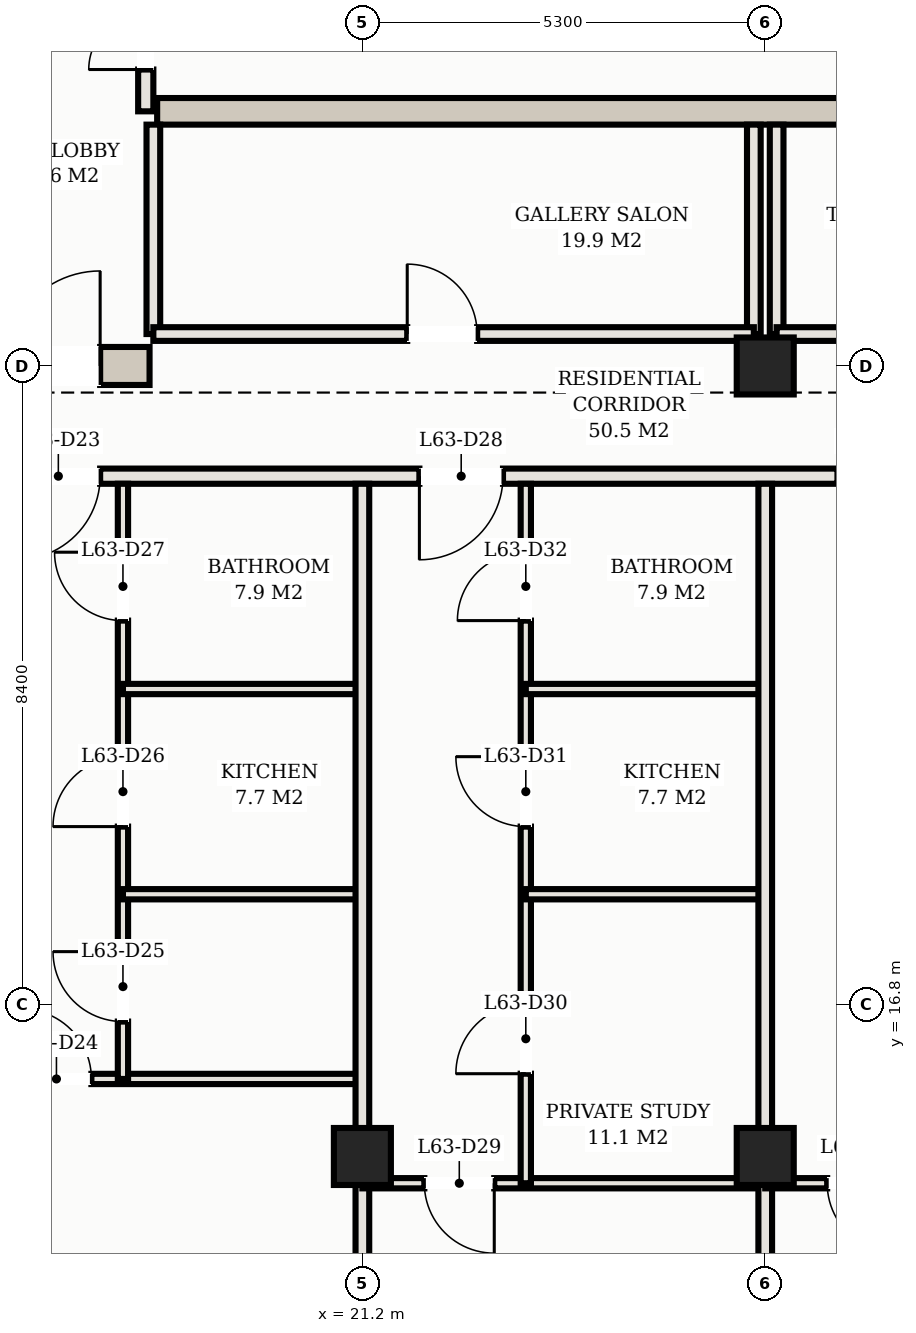
"""IFC4 building model, lengths in metres.
Left out: names, types, materials, properties, quantities, classifications, styles, units other than length and angle.
Written with IfcOpenShell. Run it as: python <this file> out.ifc"""

import sys

from ifc_helpers import new_model, si_unit, direction, frame, frame_2d, origin, origin_2d, place, context, subcontext, project, spatial, rectangle, hollow_rectangle, extrude, element, fill, save


model = new_model("IFC4")
c1 = context("Model", 3, precision=1e-05, world=origin(), true_north=direction((0.0, 1.0)))
c2 = subcontext(c1, "Body", "Model", "MODEL_VIEW")
j1 = project(units=[si_unit("LENGTHUNIT", "METRE"), si_unit("PLANEANGLEUNIT", "RADIAN")], contexts=[c1])
p1 = place(None, origin())
s1 = spatial("IfcSite", under=j1, at=p1, CompositionType="ELEMENT")
p2 = place(p1, origin())
s2 = spatial("IfcBuilding", under=s1, at=p2, CompositionType="ELEMENT")
p3 = place(p2, frame((0.0, 0.0, 229.7)))
s3 = spatial("IfcBuildingStorey", under=s2, at=p3, CompositionType="ELEMENT", Elevation=229.7)
p4 = place(p3, frame((10.35, 25.2, 0.0), z_axis=(0.0, 0.0, 1.0), x_axis=(1.0, 0.0, 0.0)))
e1 = element("IfcWall", 1, at=p4, inside=s3, PredefinedType="SHEAR", context=c2, shape_type="SweptSolid", body=[
    extrude(rectangle(XDim=8.05, YDim=0.5, at=frame_2d((4.025, 0.0))), origin(), (0.0, 0.0, 1.0), 3.11),
])
p5 = place(p4, frame((6.15, 0.0, 0.0)))
e2 = element("IfcOpeningElement", 2, at=p5, cuts=e1, PredefinedType="OPENING", context=c2, shape_type="SweptSolid", body=[
    extrude(rectangle(XDim=1.25, YDim=2.2, at=frame_2d((0.625, 1.1))), frame((0.0, 0.26, 0.0), z_axis=(0.0, -1.0, 0.0), x_axis=(1.0, 0.0, 0.0)), (0.0, 0.0, 1.0), 0.52),
])
p6 = place(p3, frame((18.5, 28.55, 0.0), z_axis=(0.0, 0.0, 1.0), x_axis=(1.0, 0.0, 0.0)))
e3 = element("IfcWall", 3, at=p6, inside=s3, PredefinedType="SHEAR", context=c2, shape_type="SweptSolid", body=[
    extrude(rectangle(XDim=16.0, YDim=0.35, at=frame_2d((8.0, 0.0))), origin(), (0.0, 0.0, 1.0), 3.11),
])
for number, where, z_axis, x_axis in (
    (4, (26.5, 25.2, 0.0), (0.0, 0.0, 1.0), (1.0, 0.0, 0.0)),
    (5, (21.2, 14.8, 0.0), (0.0, 0.0, 1.0), (1.0, 0.0, 0.0)),
    (6, (26.5, 14.8, 0.0), (0.0, 0.0, 1.0), (1.0, 0.0, 0.0)),
):
    element("IfcColumn", number, at=place(p3, frame(where, z_axis=z_axis, x_axis=x_axis)), inside=s3, PredefinedType="COLUMN", context=c2, shape_type="SweptSolid", body=[
        extrude(hollow_rectangle(XDim=0.75, YDim=0.75, WallThickness=0.025, at=origin_2d()), origin(), (0.0, 0.0, 1.0), 3.3),
    ])
p7 = place(p3, frame((18.35, 28.55, 0.0), z_axis=(0.0, 0.0, 1.0), x_axis=(0.0, 1.0, 0.0)))
e7 = element("IfcWall", 7, at=p7, inside=s3, PredefinedType="PARTITIONING", context=c2, shape_type="SweptSolid", body=[
    extrude(rectangle(XDim=2.6, YDim=0.2, at=frame_2d((1.3, 0.0))), origin(), (0.0, 0.0, 1.0), 2.43),
])
p8 = place(p7, frame((0.55, 0.0, 0.0)))
e8 = element("IfcOpeningElement", 8, at=p8, cuts=e7, PredefinedType="OPENING", context=c2, shape_type="SweptSolid", body=[
    extrude(rectangle(XDim=1.5, YDim=2.25, at=frame_2d((0.75, 1.125))), frame((0.0, 0.11, 0.0), z_axis=(0.0, -1.0, 0.0), x_axis=(1.0, 0.0, 0.0)), (0.0, 0.0, 1.0), 0.22),
])
for number, where, z_axis, x_axis in (
    (9, (18.45, 25.62, 0.0), (0.0, 0.0, 1.0), (0.0, 1.0, 0.0)),
    (10, (26.35, 25.62, 0.0), (0.0, 0.0, 1.0), (0.0, 1.0, 0.0)),
):
    element("IfcWall", number, at=place(p3, frame(where, z_axis=z_axis, x_axis=x_axis)), inside=s3, PredefinedType="PARTITIONING", context=c2, shape_type="SweptSolid", body=[
        extrude(rectangle(XDim=2.755, YDim=0.18, at=frame_2d((1.377, 0.0))), origin(), (0.0, 0.0, 1.0), 2.43),
    ])
p9 = place(p3, frame((18.45, 25.62, 0.0), z_axis=(0.0, 0.0, 1.0), x_axis=(1.0, 0.0, 0.0)))
e11 = element("IfcWall", 11, at=p9, inside=s3, PredefinedType="PARTITIONING", context=c2, shape_type="SweptSolid", body=[
    extrude(rectangle(XDim=7.9, YDim=0.18, at=frame_2d((3.95, 0.0))), origin(), (0.0, 0.0, 1.0), 2.43),
])
p10 = place(p9, frame((3.34, 0.0, 0.0)))
e12 = element("IfcOpeningElement", 12, at=p10, cuts=e11, PredefinedType="OPENING", context=c2, shape_type="SweptSolid", body=[
    extrude(rectangle(XDim=0.92, YDim=2.15, at=frame_2d((0.46, 1.075))), frame((0.0, 0.1, 0.0), z_axis=(0.0, -1.0, 0.0), x_axis=(1.0, 0.0, 0.0)), (0.0, 0.0, 1.0), 0.2),
])
p11 = place(p3, frame((26.65, 25.62, 0.0), z_axis=(0.0, 0.0, 1.0), x_axis=(0.0, 1.0, 0.0)))
e13 = element("IfcWall", 13, at=p11, inside=s3, PredefinedType="PARTITIONING", context=c2, shape_type="SweptSolid", body=[
    extrude(rectangle(XDim=2.755, YDim=0.18, at=frame_2d((1.377, 0.0))), origin(), (0.0, 0.0, 1.0), 2.43),
])
p12 = place(p3, frame((26.65, 25.62, 0.0), z_axis=(0.0, 0.0, 1.0), x_axis=(1.0, 0.0, 0.0)))
e14 = element("IfcWall", 14, at=p12, inside=s3, PredefinedType="PARTITIONING", context=c2, shape_type="SweptSolid", body=[
    extrude(rectangle(XDim=7.9, YDim=0.18, at=frame_2d((3.95, 0.0))), origin(), (0.0, 0.0, 1.0), 2.43),
])
p13 = place(p12, frame((3.34, 0.0, 0.0)))
e15 = element("IfcOpeningElement", 15, at=p13, cuts=e14, PredefinedType="OPENING", context=c2, shape_type="SweptSolid", body=[
    extrude(rectangle(XDim=0.92, YDim=2.15, at=frame_2d((0.46, 1.075))), frame((0.0, 0.1, 0.0), z_axis=(0.0, -1.0, 0.0), x_axis=(1.0, 0.0, 0.0)), (0.0, 0.0, 1.0), 0.2),
])
p14 = place(p3, frame((6.72, 23.75, 0.0), z_axis=(0.0, 0.0, 1.0), x_axis=(1.0, 0.0, 0.0)))
e16 = element("IfcWall", 16, at=p14, inside=s3, PredefinedType="PARTITIONING", context=c2, shape_type="SweptSolid", body=[
    extrude(rectangle(XDim=39.56, YDim=0.2, at=frame_2d((19.78, 0.0))), origin(), (0.0, 0.0, 1.0), 2.43),
])
p15 = place(p14, frame((4.63, 0.0, 0.0)))
e17 = element("IfcOpeningElement", 17, at=p15, cuts=e16, PredefinedType="OPENING", context=c2, shape_type="SweptSolid", body=[
    extrude(rectangle(XDim=1.1, YDim=2.25, at=frame_2d((0.55, 1.125))), frame((0.0, 0.11, 0.0), z_axis=(0.0, -1.0, 0.0), x_axis=(1.0, 0.0, 0.0)), (0.0, 0.0, 1.0), 0.22),
])
p16 = place(p14, frame((9.93, 0.0, 0.0)))
e18 = element("IfcOpeningElement", 18, at=p16, cuts=e16, PredefinedType="OPENING", context=c2, shape_type="SweptSolid", body=[
    extrude(rectangle(XDim=1.1, YDim=2.25, at=frame_2d((0.55, 1.125))), frame((0.0, 0.11, 0.0), z_axis=(0.0, -1.0, 0.0), x_axis=(1.0, 0.0, 0.0)), (0.0, 0.0, 1.0), 0.22),
])
p17 = place(p14, frame((15.23, 0.0, 0.0)))
e19 = element("IfcOpeningElement", 19, at=p17, cuts=e16, PredefinedType="OPENING", context=c2, shape_type="SweptSolid", body=[
    extrude(rectangle(XDim=1.1, YDim=2.25, at=frame_2d((0.55, 1.125))), frame((0.0, 0.11, 0.0), z_axis=(0.0, -1.0, 0.0), x_axis=(1.0, 0.0, 0.0)), (0.0, 0.0, 1.0), 0.22),
])
p18 = place(p14, frame((20.73, 0.0, 0.0)))
e20 = element("IfcOpeningElement", 20, at=p18, cuts=e16, PredefinedType="OPENING", context=c2, shape_type="SweptSolid", body=[
    extrude(rectangle(XDim=1.1, YDim=2.25, at=frame_2d((0.55, 1.125))), frame((0.0, 0.11, 0.0), z_axis=(0.0, -1.0, 0.0), x_axis=(1.0, 0.0, 0.0)), (0.0, 0.0, 1.0), 0.22),
])
p19 = place(p14, frame((25.83, 0.0, 0.0)))
e21 = element("IfcOpeningElement", 21, at=p19, cuts=e16, PredefinedType="OPENING", context=c2, shape_type="SweptSolid", body=[
    extrude(rectangle(XDim=1.1, YDim=2.25, at=frame_2d((0.55, 1.125))), frame((0.0, 0.11, 0.0), z_axis=(0.0, -1.0, 0.0), x_axis=(1.0, 0.0, 0.0)), (0.0, 0.0, 1.0), 0.22),
])
p20 = place(p14, frame((31.13, 0.0, 0.0)))
e22 = element("IfcOpeningElement", 22, at=p20, cuts=e16, PredefinedType="OPENING", context=c2, shape_type="SweptSolid", body=[
    extrude(rectangle(XDim=1.1, YDim=2.25, at=frame_2d((0.55, 1.125))), frame((0.0, 0.11, 0.0), z_axis=(0.0, -1.0, 0.0), x_axis=(1.0, 0.0, 0.0)), (0.0, 0.0, 1.0), 0.22),
])
p21 = place(p14, frame((2.085, 0.0, 0.0)))
e23 = element("IfcOpeningElement", 23, at=p21, cuts=e16, PredefinedType="OPENING", context=c2, shape_type="SweptSolid", body=[
    extrude(rectangle(XDim=0.92, YDim=2.15, at=frame_2d((0.46, 1.075))), frame((0.0, 0.11, 0.0), z_axis=(0.0, -1.0, 0.0), x_axis=(1.0, 0.0, 0.0)), (0.0, 0.0, 1.0), 0.22),
])
p22 = place(p14, frame((36.555, 0.0, 0.0)))
e24 = element("IfcOpeningElement", 24, at=p22, cuts=e16, PredefinedType="OPENING", context=c2, shape_type="SweptSolid", body=[
    extrude(rectangle(XDim=0.92, YDim=2.15, at=frame_2d((0.46, 1.075))), frame((0.0, 0.11, 0.0), z_axis=(0.0, -1.0, 0.0), x_axis=(1.0, 0.0, 0.0)), (0.0, 0.0, 1.0), 0.22),
])
p23 = place(p3, frame((15.9, 15.82, 0.0), z_axis=(0.0, 0.0, 1.0), x_axis=(1.0, 0.0, 0.0)))
e25 = element("IfcWall", 25, at=p23, inside=s3, PredefinedType="PARTITIONING", context=c2, shape_type="SweptSolid", body=[
    extrude(rectangle(XDim=5.3, YDim=0.135, at=frame_2d((2.65, 0.0))), origin(), (0.0, 0.0, 1.0), 2.43),
])
p24 = place(p23, frame((0.815, 0.0, 0.0)))
e26 = element("IfcOpeningElement", 26, at=p24, cuts=e25, PredefinedType="OPENING", context=c2, shape_type="SweptSolid", body=[
    extrude(rectangle(XDim=0.92, YDim=2.15, at=frame_2d((0.46, 1.075))), frame((0.0, 0.078, 0.0), z_axis=(0.0, -1.0, 0.0), x_axis=(1.0, 0.0, 0.0)), (0.0, 0.0, 1.0), 0.155),
])
p25 = place(p3, frame((18.05, 15.82, 0.0), z_axis=(0.0, 0.0, 1.0), x_axis=(0.0, 1.0, 0.0)))
e27 = element("IfcWall", 27, at=p25, inside=s3, PredefinedType="PARTITIONING", context=c2, shape_type="SweptSolid", body=[
    extrude(rectangle(XDim=7.83, YDim=0.135, at=frame_2d((3.915, 0.0))), origin(), (0.0, 0.0, 1.0), 2.43),
])
p26 = place(p25, frame((0.755, 0.0, 0.0)))
e28 = element("IfcOpeningElement", 28, at=p26, cuts=e27, PredefinedType="OPENING", context=c2, shape_type="SweptSolid", body=[
    extrude(rectangle(XDim=0.92, YDim=2.15, at=frame_2d((0.46, 1.075))), frame((0.0, 0.078, 0.0), z_axis=(0.0, -1.0, 0.0), x_axis=(1.0, 0.0, 0.0)), (0.0, 0.0, 1.0), 0.155),
])
p27 = place(p25, frame((3.32, 0.0, 0.0)))
e29 = element("IfcOpeningElement", 29, at=p27, cuts=e27, PredefinedType="OPENING", context=c2, shape_type="SweptSolid", body=[
    extrude(rectangle(XDim=0.92, YDim=2.15, at=frame_2d((0.46, 1.075))), frame((0.0, 0.078, 0.0), z_axis=(0.0, -1.0, 0.0), x_axis=(1.0, 0.0, 0.0)), (0.0, 0.0, 1.0), 0.155),
])
p28 = place(p25, frame((6.03, 0.0, 0.0)))
e30 = element("IfcOpeningElement", 30, at=p28, cuts=e27, PredefinedType="OPENING", context=c2, shape_type="SweptSolid", body=[
    extrude(rectangle(XDim=0.9, YDim=2.15, at=frame_2d((0.45, 1.075))), frame((0.0, 0.078, 0.0), z_axis=(0.0, -1.0, 0.0), x_axis=(1.0, 0.0, 0.0)), (0.0, 0.0, 1.0), 0.155),
])
for number, where, z_axis, x_axis in (
    (31, (18.05, 18.25, 0.0), (0.0, 0.0, 1.0), (1.0, 0.0, 0.0)),
    (32, (18.05, 20.95, 0.0), (0.0, 0.0, 1.0), (1.0, 0.0, 0.0)),
):
    element("IfcWall", number, at=place(p3, frame(where, z_axis=z_axis, x_axis=x_axis)), inside=s3, PredefinedType="PARTITIONING", context=c2, shape_type="SweptSolid", body=[
        extrude(rectangle(XDim=3.15, YDim=0.135, at=frame_2d((1.575, 0.0))), origin(), (0.0, 0.0, 1.0), 2.43),
    ])
p29 = place(p3, frame((21.2, 5.331, 0.0), z_axis=(0.0, 0.0, 1.0), x_axis=(0.0, 1.0, 0.0)))
e33 = element("IfcWall", 33, at=p29, inside=s3, PredefinedType="PARTITIONING", context=c2, shape_type="SweptSolid", body=[
    extrude(rectangle(XDim=18.319, YDim=0.18, at=frame_2d((9.159, 0.0))), origin(), (0.0, 0.0, 1.0), 2.43),
])
p30 = place(p3, frame((21.2, 14.448, 0.0), z_axis=(0.0, 0.0, 1.0), x_axis=(1.0, 0.0, 0.0)))
e34 = element("IfcWall", 34, at=p30, inside=s3, PredefinedType="PARTITIONING", context=c2, shape_type="SweptSolid", body=[
    extrude(rectangle(XDim=5.3, YDim=0.135, at=frame_2d((2.65, 0.0))), origin(), (0.0, 0.0, 1.0), 2.43),
])
p31 = place(p30, frame((0.815, 0.0, 0.0)))
e35 = element("IfcOpeningElement", 35, at=p31, cuts=e34, PredefinedType="OPENING", context=c2, shape_type="SweptSolid", body=[
    extrude(rectangle(XDim=0.92, YDim=2.15, at=frame_2d((0.46, 1.075))), frame((0.0, 0.078, 0.0), z_axis=(0.0, -1.0, 0.0), x_axis=(1.0, 0.0, 0.0)), (0.0, 0.0, 1.0), 0.155),
])
p32 = place(p3, frame((23.35, 14.448, 0.0), z_axis=(0.0, 0.0, 1.0), x_axis=(0.0, 1.0, 0.0)))
e36 = element("IfcWall", 36, at=p32, inside=s3, PredefinedType="PARTITIONING", context=c2, shape_type="SweptSolid", body=[
    extrude(rectangle(XDim=9.202, YDim=0.135, at=frame_2d((4.601, 0.0))), origin(), (0.0, 0.0, 1.0), 2.43),
])
p33 = place(p32, frame((1.441, 0.0, 0.0)))
e37 = element("IfcOpeningElement", 37, at=p33, cuts=e36, PredefinedType="OPENING", context=c2, shape_type="SweptSolid", body=[
    extrude(rectangle(XDim=0.92, YDim=2.15, at=frame_2d((0.46, 1.075))), frame((0.0, 0.078, 0.0), z_axis=(0.0, -1.0, 0.0), x_axis=(1.0, 0.0, 0.0)), (0.0, 0.0, 1.0), 0.155),
])
p34 = place(p32, frame((4.692, 0.0, 0.0)))
e38 = element("IfcOpeningElement", 38, at=p34, cuts=e36, PredefinedType="OPENING", context=c2, shape_type="SweptSolid", body=[
    extrude(rectangle(XDim=0.92, YDim=2.15, at=frame_2d((0.46, 1.075))), frame((0.0, 0.078, 0.0), z_axis=(0.0, -1.0, 0.0), x_axis=(1.0, 0.0, 0.0)), (0.0, 0.0, 1.0), 0.155),
])
p35 = place(p32, frame((7.402, 0.0, 0.0)))
e39 = element("IfcOpeningElement", 39, at=p35, cuts=e36, PredefinedType="OPENING", context=c2, shape_type="SweptSolid", body=[
    extrude(rectangle(XDim=0.9, YDim=2.15, at=frame_2d((0.45, 1.075))), frame((0.0, 0.078, 0.0), z_axis=(0.0, -1.0, 0.0), x_axis=(1.0, 0.0, 0.0)), (0.0, 0.0, 1.0), 0.155),
])
for number, where, z_axis, x_axis in (
    (40, (23.35, 18.25, 0.0), (0.0, 0.0, 1.0), (1.0, 0.0, 0.0)),
    (41, (23.35, 20.95, 0.0), (0.0, 0.0, 1.0), (1.0, 0.0, 0.0)),
):
    element("IfcWall", number, at=place(p3, frame(where, z_axis=z_axis, x_axis=x_axis)), inside=s3, PredefinedType="PARTITIONING", context=c2, shape_type="SweptSolid", body=[
        extrude(rectangle(XDim=3.15, YDim=0.135, at=frame_2d((1.575, 0.0))), origin(), (0.0, 0.0, 1.0), 2.43),
    ])
p36 = place(p3, frame((26.5, 4.42, 0.0), z_axis=(0.0, 0.0, 1.0), x_axis=(0.0, 1.0, 0.0)))
e42 = element("IfcWall", 42, at=p36, inside=s3, PredefinedType="PARTITIONING", context=c2, shape_type="SweptSolid", body=[
    extrude(rectangle(XDim=19.23, YDim=0.18, at=frame_2d((9.615, 0.0))), origin(), (0.0, 0.0, 1.0), 2.43),
])
p37 = place(p3, frame((26.5, 14.448, 0.0), z_axis=(0.0, 0.0, 1.0), x_axis=(1.0, 0.0, 0.0)))
e43 = element("IfcWall", 43, at=p37, inside=s3, PredefinedType="PARTITIONING", context=c2, shape_type="SweptSolid", body=[
    extrude(rectangle(XDim=5.3, YDim=0.135, at=frame_2d((2.65, 0.0))), origin(), (0.0, 0.0, 1.0), 2.43),
])
p38 = place(p37, frame((0.815, 0.0, 0.0)))
e44 = element("IfcOpeningElement", 44, at=p38, cuts=e43, PredefinedType="OPENING", context=c2, shape_type="SweptSolid", body=[
    extrude(rectangle(XDim=0.92, YDim=2.15, at=frame_2d((0.46, 1.075))), frame((0.0, 0.078, 0.0), z_axis=(0.0, -1.0, 0.0), x_axis=(1.0, 0.0, 0.0)), (0.0, 0.0, 1.0), 0.155),
])
p39 = place(p5, origin())
e45 = element("IfcDoor", 45, at=p39, inside=s3, OperationType="SINGLE_SWING_RIGHT", PredefinedType="DOOR", context=c2, shape_type="SweptSolid", body=[
    extrude(rectangle(XDim=1.25, YDim=2.2, at=frame_2d((0.625, 1.1))), frame((0.0, 0.025, 0.0), z_axis=(0.0, -1.0, 0.0), x_axis=(1.0, 0.0, 0.0)), (0.0, 0.0, 1.0), 0.05),
])
fill(e2, e45)
p40 = place(p8, origin())
e46 = element("IfcDoor", 46, at=p40, inside=s3, OperationType="DOUBLE_DOOR_SINGLE_SWING", PredefinedType="DOOR", context=c2, shape_type="SweptSolid", body=[
    extrude(rectangle(XDim=1.5, YDim=2.25, at=frame_2d((0.75, 1.125))), frame((0.0, 0.025, 0.0), z_axis=(0.0, -1.0, 0.0), x_axis=(1.0, 0.0, 0.0)), (0.0, 0.0, 1.0), 0.05),
])
fill(e8, e46)
p41 = place(p10, origin())
e47 = element("IfcDoor", 47, at=p41, inside=s3, OperationType="SINGLE_SWING_LEFT", PredefinedType="DOOR", context=c2, shape_type="SweptSolid", body=[
    extrude(rectangle(XDim=0.92, YDim=2.15, at=frame_2d((0.46, 1.075))), frame((0.0, 0.025, 0.0), z_axis=(0.0, -1.0, 0.0), x_axis=(1.0, 0.0, 0.0)), (0.0, 0.0, 1.0), 0.05),
])
fill(e12, e47)
p42 = place(p16, frame((1.1, 0.0, 0.0), z_axis=(0.0, 0.0, 1.0), x_axis=(-1.0, 0.0, 0.0)))
e48 = element("IfcDoor", 48, at=p42, inside=s3, OperationType="SINGLE_SWING_RIGHT", PredefinedType="DOOR", context=c2, shape_type="SweptSolid", body=[
    extrude(rectangle(XDim=1.1, YDim=2.25, at=frame_2d((0.55, 1.125))), frame((0.0, 0.025, 0.0), z_axis=(0.0, -1.0, 0.0), x_axis=(1.0, 0.0, 0.0)), (0.0, 0.0, 1.0), 0.05),
])
fill(e18, e48)
p43 = place(p24, origin())
e49 = element("IfcDoor", 49, at=p43, inside=s3, OperationType="SINGLE_SWING_LEFT", PredefinedType="DOOR", context=c2, shape_type="SweptSolid", body=[
    extrude(rectangle(XDim=0.92, YDim=2.15, at=frame_2d((0.46, 1.075))), frame((0.0, 0.025, 0.0), z_axis=(0.0, -1.0, 0.0), x_axis=(1.0, 0.0, 0.0)), (0.0, 0.0, 1.0), 0.05),
])
fill(e26, e49)
p44 = place(p26, origin())
e50 = element("IfcDoor", 50, at=p44, inside=s3, OperationType="SINGLE_SWING_RIGHT", PredefinedType="DOOR", context=c2, shape_type="SweptSolid", body=[
    extrude(rectangle(XDim=0.92, YDim=2.15, at=frame_2d((0.46, 1.075))), frame((0.0, 0.025, 0.0), z_axis=(0.0, -1.0, 0.0), x_axis=(1.0, 0.0, 0.0)), (0.0, 0.0, 1.0), 0.05),
])
fill(e28, e50)
p45 = place(p27, origin())
e51 = element("IfcDoor", 51, at=p45, inside=s3, OperationType="SINGLE_SWING_LEFT", PredefinedType="DOOR", context=c2, shape_type="SweptSolid", body=[
    extrude(rectangle(XDim=0.92, YDim=2.15, at=frame_2d((0.46, 1.075))), frame((0.0, 0.025, 0.0), z_axis=(0.0, -1.0, 0.0), x_axis=(1.0, 0.0, 0.0)), (0.0, 0.0, 1.0), 0.05),
])
fill(e29, e51)
p46 = place(p28, origin())
e52 = element("IfcDoor", 52, at=p46, inside=s3, OperationType="SINGLE_SWING_RIGHT", PredefinedType="DOOR", context=c2, shape_type="SweptSolid", body=[
    extrude(rectangle(XDim=0.9, YDim=2.15, at=frame_2d((0.45, 1.075))), frame((0.0, 0.025, 0.0), z_axis=(0.0, -1.0, 0.0), x_axis=(1.0, 0.0, 0.0)), (0.0, 0.0, 1.0), 0.05),
])
fill(e30, e52)
p47 = place(p17, frame((1.1, 0.0, 0.0), z_axis=(0.0, 0.0, 1.0), x_axis=(-1.0, 0.0, 0.0)))
e53 = element("IfcDoor", 53, at=p47, inside=s3, OperationType="SINGLE_SWING_RIGHT", PredefinedType="DOOR", context=c2, shape_type="SweptSolid", body=[
    extrude(rectangle(XDim=1.1, YDim=2.25, at=frame_2d((0.55, 1.125))), frame((0.0, 0.025, 0.0), z_axis=(0.0, -1.0, 0.0), x_axis=(1.0, 0.0, 0.0)), (0.0, 0.0, 1.0), 0.05),
])
fill(e19, e53)
p48 = place(p31, frame((0.92, 0.0, 0.0), z_axis=(0.0, 0.0, 1.0), x_axis=(-1.0, 0.0, 0.0)))
e54 = element("IfcDoor", 54, at=p48, inside=s3, OperationType="SINGLE_SWING_LEFT", PredefinedType="DOOR", context=c2, shape_type="SweptSolid", body=[
    extrude(rectangle(XDim=0.92, YDim=2.15, at=frame_2d((0.46, 1.075))), frame((0.0, 0.025, 0.0), z_axis=(0.0, -1.0, 0.0), x_axis=(1.0, 0.0, 0.0)), (0.0, 0.0, 1.0), 0.05),
])
fill(e35, e54)
p49 = place(p33, origin())
e55 = element("IfcDoor", 55, at=p49, inside=s3, OperationType="SINGLE_SWING_LEFT", PredefinedType="DOOR", context=c2, shape_type="SweptSolid", body=[
    extrude(rectangle(XDim=0.92, YDim=2.15, at=frame_2d((0.46, 1.075))), frame((0.0, 0.025, 0.0), z_axis=(0.0, -1.0, 0.0), x_axis=(1.0, 0.0, 0.0)), (0.0, 0.0, 1.0), 0.05),
])
fill(e37, e55)
p50 = place(p34, origin())
e56 = element("IfcDoor", 56, at=p50, inside=s3, OperationType="SINGLE_SWING_RIGHT", PredefinedType="DOOR", context=c2, shape_type="SweptSolid", body=[
    extrude(rectangle(XDim=0.92, YDim=2.15, at=frame_2d((0.46, 1.075))), frame((0.0, 0.025, 0.0), z_axis=(0.0, -1.0, 0.0), x_axis=(1.0, 0.0, 0.0)), (0.0, 0.0, 1.0), 0.05),
])
fill(e38, e56)
p51 = place(p35, origin())
e57 = element("IfcDoor", 57, at=p51, inside=s3, OperationType="SINGLE_SWING_LEFT", PredefinedType="DOOR", context=c2, shape_type="SweptSolid", body=[
    extrude(rectangle(XDim=0.9, YDim=2.15, at=frame_2d((0.45, 1.075))), frame((0.0, 0.025, 0.0), z_axis=(0.0, -1.0, 0.0), x_axis=(1.0, 0.0, 0.0)), (0.0, 0.0, 1.0), 0.05),
])
fill(e39, e57)
p52 = place(p38, frame((0.92, 0.0, 0.0), z_axis=(0.0, 0.0, 1.0), x_axis=(-1.0, 0.0, 0.0)))
e58 = element("IfcDoor", 58, at=p52, inside=s3, OperationType="SINGLE_SWING_LEFT", PredefinedType="DOOR", context=c2, shape_type="SweptSolid", body=[
    extrude(rectangle(XDim=0.92, YDim=2.15, at=frame_2d((0.46, 1.075))), frame((0.0, 0.025, 0.0), z_axis=(0.0, -1.0, 0.0), x_axis=(1.0, 0.0, 0.0)), (0.0, 0.0, 1.0), 0.05),
])
fill(e44, e58)
save(model, sys.argv[1])
